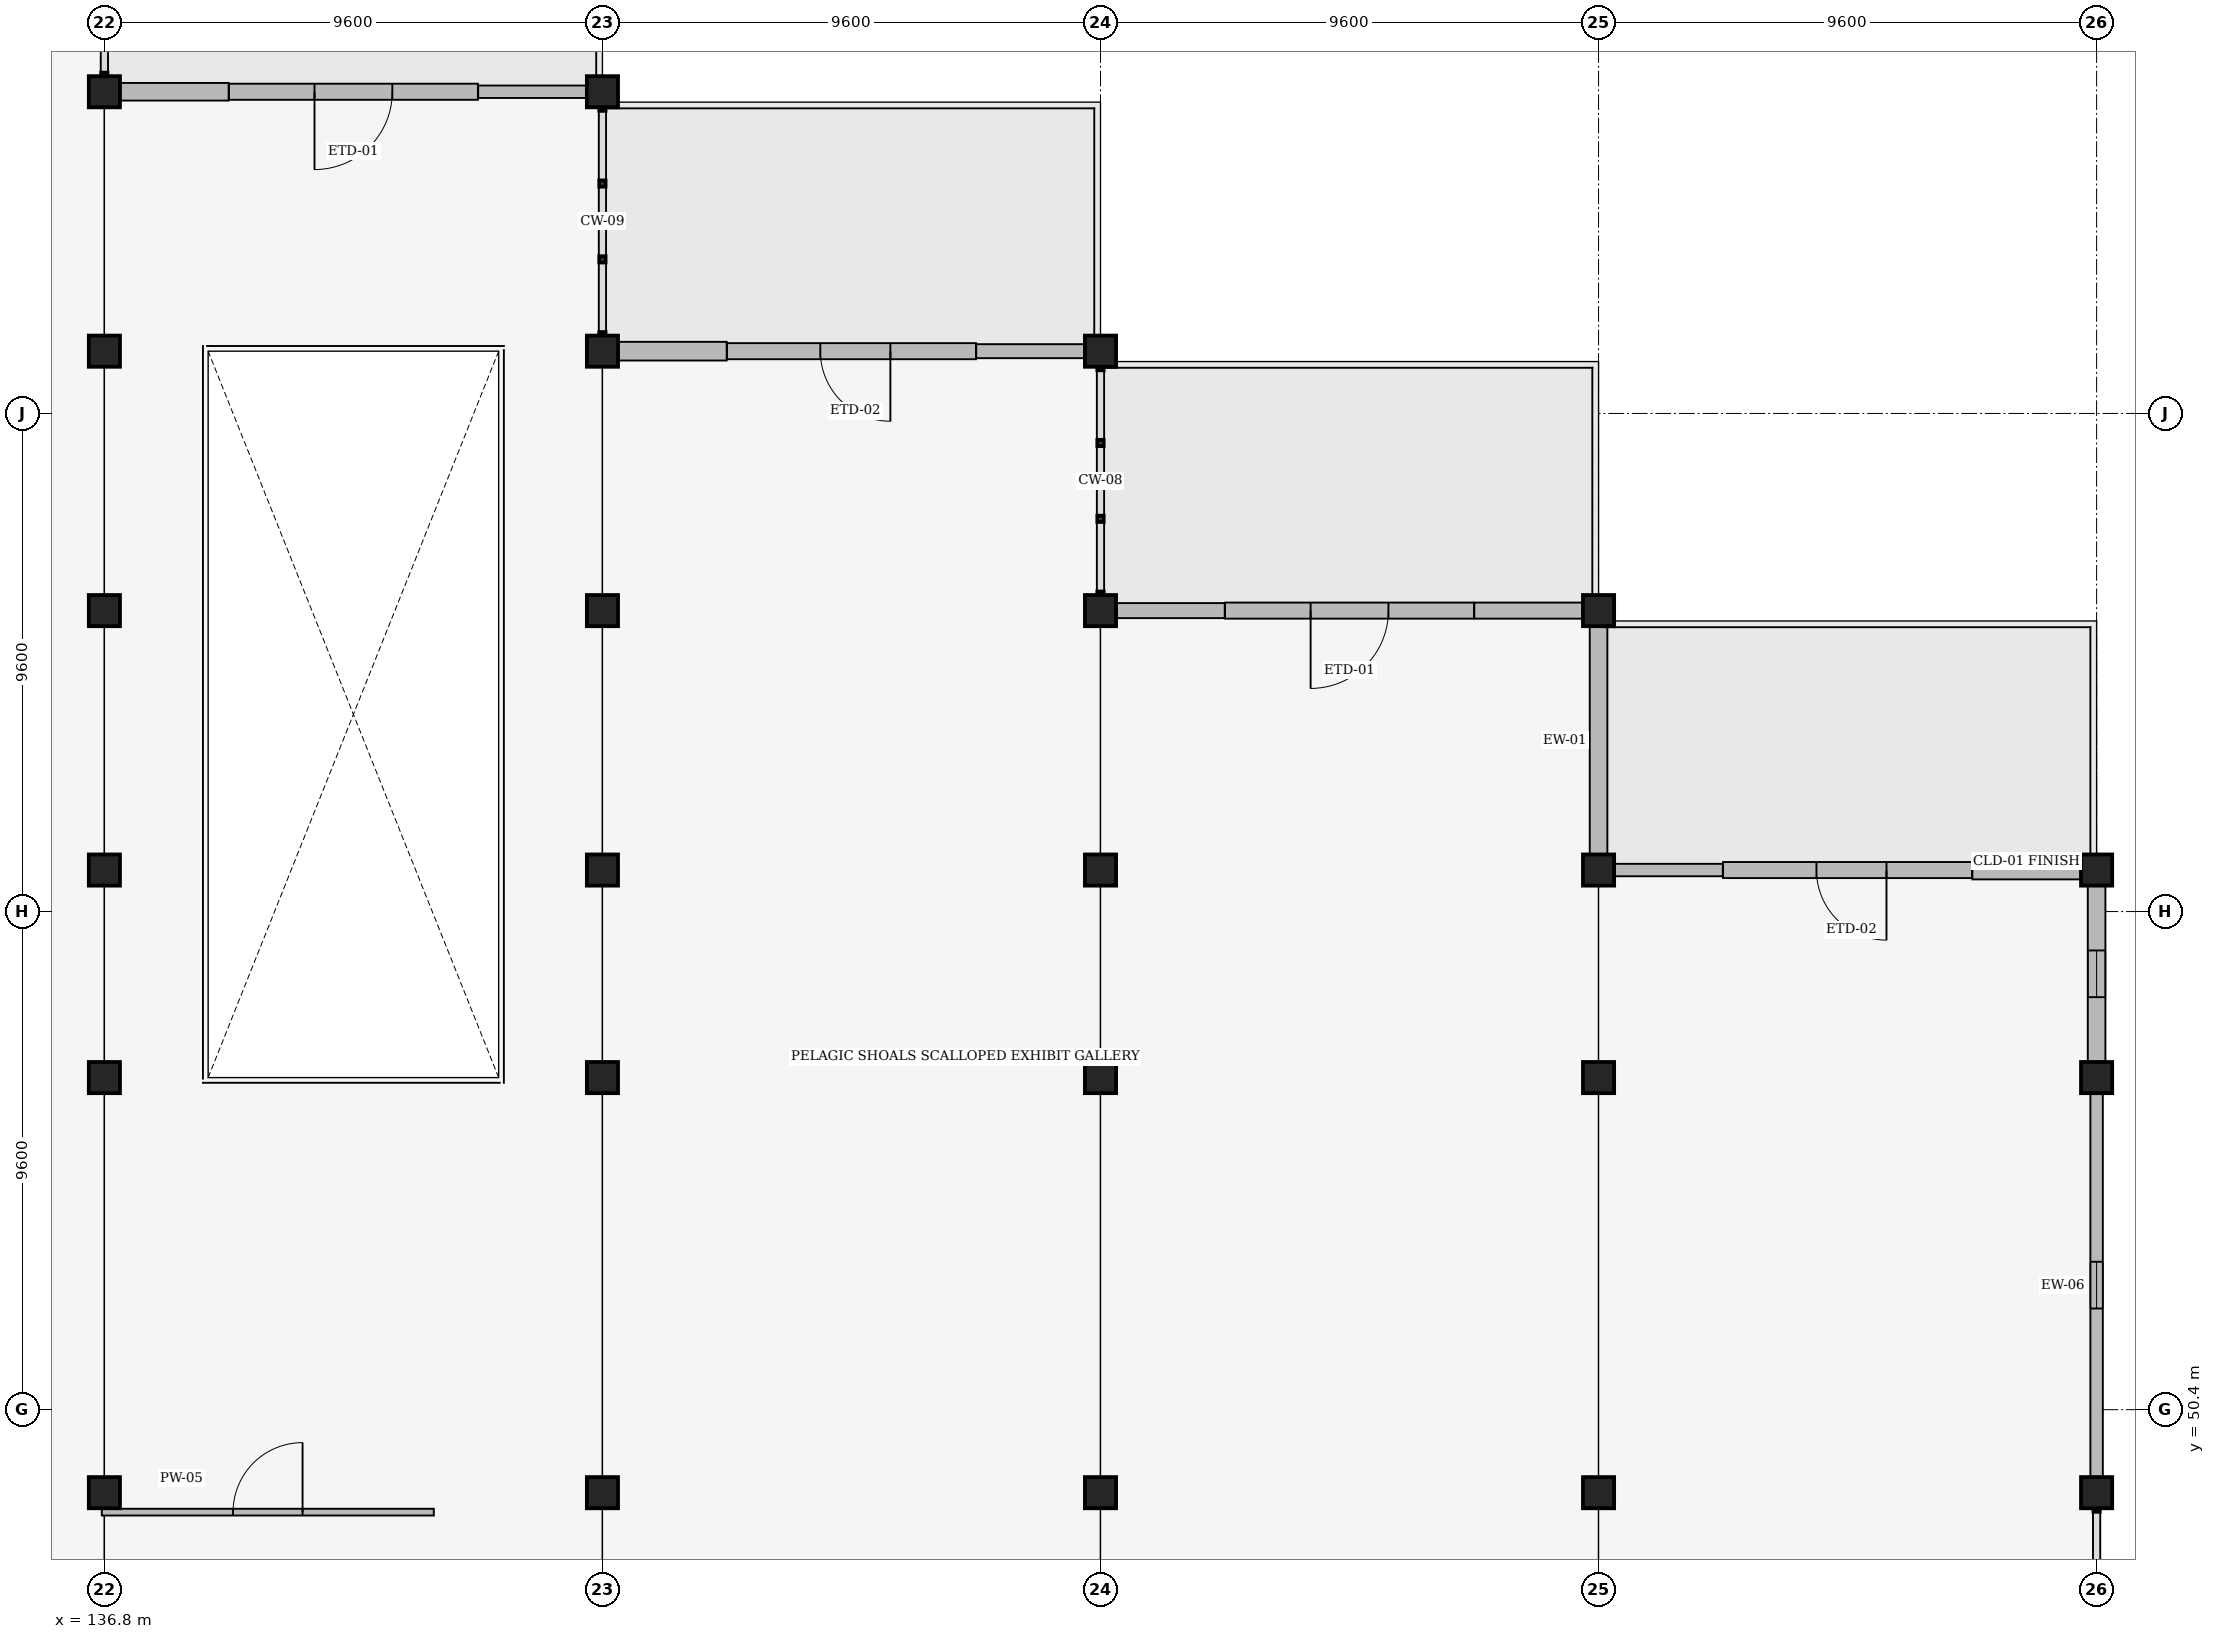
"""IFC4 building model, lengths in metres.
Left out: names, types, materials, properties, quantities, classifications, styles, units other than length and angle.
Written with IfcOpenShell. Run it as: python <this file> out.ifc"""

import sys

from ifc_helpers import new_model, si_unit, direction, frame, frame_2d, origin, origin_2d, place, context, subcontext, project, spatial, rectangle, extrude, element, fill, save


model = new_model("IFC4")
c1 = context("Model", 3, precision=1e-05, world=origin(), true_north=direction((0.0, 1.0)))
c2 = subcontext(c1, "Body", "Model", "MODEL_VIEW")
j1 = project(units=[si_unit("LENGTHUNIT", "METRE"), si_unit("PLANEANGLEUNIT", "RADIAN")], contexts=[c1])
p1 = place(None, origin())
s1 = spatial("IfcSite", under=j1, at=p1, CompositionType="ELEMENT")
p2 = place(p1, origin())
s2 = spatial("IfcBuilding", under=s1, at=p2, CompositionType="ELEMENT")
p3 = place(p2, frame((0.0, 0.0, 10.5)))
s3 = spatial("IfcBuildingStorey", under=s2, at=p3, CompositionType="ELEMENT", Elevation=10.5)
for number, where, z_axis, x_axis in (
    (1, (136.8, 48.8, 0.0), (0.0, 0.0, 1.0), (1.0, 0.0, 0.0)),
    (2, (136.8, 56.8, 0.0), (0.0, 0.0, 1.0), (1.0, 0.0, 0.0)),
    (3, (136.8, 60.8, 0.0), (0.0, 0.0, 1.0), (1.0, 0.0, 0.0)),
    (4, (136.8, 65.8, 0.0), (0.0, 0.0, 1.0), (1.0, 0.0, 0.0)),
    (5, (136.8, 70.8, 0.0), (0.0, 0.0, 1.0), (1.0, 0.0, 0.0)),
    (6, (136.8, 75.8, 0.0), (0.0, 0.0, 1.0), (1.0, 0.0, 0.0)),
    (7, (146.4, 48.8, 0.0), (0.0, 0.0, 1.0), (1.0, 0.0, 0.0)),
    (8, (146.4, 56.8, 0.0), (0.0, 0.0, 1.0), (1.0, 0.0, 0.0)),
    (9, (146.4, 60.8, 0.0), (0.0, 0.0, 1.0), (1.0, 0.0, 0.0)),
    (10, (146.4, 65.8, 0.0), (0.0, 0.0, 1.0), (1.0, 0.0, 0.0)),
    (11, (146.4, 70.8, 0.0), (0.0, 0.0, 1.0), (1.0, 0.0, 0.0)),
    (12, (146.4, 75.8, 0.0), (0.0, 0.0, 1.0), (1.0, 0.0, 0.0)),
    (13, (156.0, 48.8, 0.0), (0.0, 0.0, 1.0), (1.0, 0.0, 0.0)),
    (14, (156.0, 56.8, 0.0), (0.0, 0.0, 1.0), (1.0, 0.0, 0.0)),
    (15, (156.0, 60.8, 0.0), (0.0, 0.0, 1.0), (1.0, 0.0, 0.0)),
    (16, (156.0, 65.8, 0.0), (0.0, 0.0, 1.0), (1.0, 0.0, 0.0)),
    (17, (156.0, 70.8, 0.0), (0.0, 0.0, 1.0), (1.0, 0.0, 0.0)),
    (18, (165.6, 48.8, 0.0), (0.0, 0.0, 1.0), (1.0, 0.0, 0.0)),
    (19, (165.6, 56.8, 0.0), (0.0, 0.0, 1.0), (1.0, 0.0, 0.0)),
    (20, (165.6, 60.8, 0.0), (0.0, 0.0, 1.0), (1.0, 0.0, 0.0)),
    (21, (165.6, 65.8, 0.0), (0.0, 0.0, 1.0), (1.0, 0.0, 0.0)),
    (22, (175.2, 48.8, 0.0), (0.0, 0.0, 1.0), (1.0, 0.0, 0.0)),
    (23, (175.2, 56.8, 0.0), (0.0, 0.0, 1.0), (1.0, 0.0, 0.0)),
    (24, (175.2, 60.8, 0.0), (0.0, 0.0, 1.0), (1.0, 0.0, 0.0)),
):
    element("IfcColumn", number, at=place(p3, frame(where, z_axis=z_axis, x_axis=x_axis)), inside=s3, PredefinedType="COLUMN", context=c2, shape_type="SweptSolid", body=[
        extrude(rectangle(XDim=0.6, YDim=0.6, at=origin_2d()), origin(), (0.0, 0.0, 1.0), 4.8),
    ])
p4 = place(p3, frame((144.0, 75.8, 0.0), z_axis=(0.0, 0.0, 1.0), x_axis=(-1.0, 0.0, 0.0)))
e25 = element("IfcWall", 25, at=p4, inside=s3, PredefinedType="SOLIDWALL", context=c2, shape_type="SweptSolid", body=[
    extrude(rectangle(XDim=4.8, YDim=0.31, at=frame_2d((2.4, 0.0))), origin(), (0.0, 0.0, 1.0), 3.912),
])
p5 = place(p4, frame((3.15, 0.0, 0.0), z_axis=(0.0, 0.0, 1.0), x_axis=(-1.0, 0.0, 0.0)))
e26 = element("IfcOpeningElement", 26, at=p5, cuts=e25, PredefinedType="OPENING", context=c2, shape_type="SweptSolid", body=[
    extrude(rectangle(XDim=1.5, YDim=2.25, at=frame_2d((0.75, 1.125))), frame((0.0, 0.165, 0.0), z_axis=(0.0, -1.0, 0.0), x_axis=(1.0, 0.0, 0.0)), (0.0, 0.0, 1.0), 0.33),
])
p6 = place(p3, frame((153.6, 70.8, 0.0), z_axis=(0.0, 0.0, 1.0), x_axis=(-1.0, 0.0, 0.0)))
e27 = element("IfcWall", 27, at=p6, inside=s3, PredefinedType="SOLIDWALL", context=c2, shape_type="SweptSolid", body=[
    extrude(rectangle(XDim=4.8, YDim=0.31, at=frame_2d((2.4, 0.0))), origin(), (0.0, 0.0, 1.0), 4.093),
])
p7 = place(p6, frame((3.0, 0.0, 0.0), z_axis=(0.0, 0.0, 1.0), x_axis=(-1.0, 0.0, 0.0)))
e28 = element("IfcOpeningElement", 28, at=p7, cuts=e27, PredefinedType="OPENING", context=c2, shape_type="SweptSolid", body=[
    extrude(rectangle(XDim=1.35, YDim=2.2, at=frame_2d((0.675, 1.1))), frame((0.0, 0.165, 0.0), z_axis=(0.0, -1.0, 0.0), x_axis=(1.0, 0.0, 0.0)), (0.0, 0.0, 1.0), 0.33),
])
p8 = place(p3, frame((163.2, 65.8, 0.0), z_axis=(0.0, 0.0, 1.0), x_axis=(-1.0, 0.0, 0.0)))
e29 = element("IfcWall", 29, at=p8, inside=s3, PredefinedType="SOLIDWALL", context=c2, shape_type="SweptSolid", body=[
    extrude(rectangle(XDim=4.8, YDim=0.31, at=frame_2d((2.4, 0.0))), origin(), (0.0, 0.0, 1.0), 3.912),
])
p9 = place(p8, frame((3.15, 0.0, 0.0), z_axis=(0.0, 0.0, 1.0), x_axis=(-1.0, 0.0, 0.0)))
e30 = element("IfcOpeningElement", 30, at=p9, cuts=e29, PredefinedType="OPENING", context=c2, shape_type="SweptSolid", body=[
    extrude(rectangle(XDim=1.5, YDim=2.25, at=frame_2d((0.75, 1.125))), frame((0.0, 0.165, 0.0), z_axis=(0.0, -1.0, 0.0), x_axis=(1.0, 0.0, 0.0)), (0.0, 0.0, 1.0), 0.33),
])
p10 = place(p3, frame((172.8, 60.8, 0.0), z_axis=(0.0, 0.0, 1.0), x_axis=(-1.0, 0.0, 0.0)))
e31 = element("IfcWall", 31, at=p10, inside=s3, PredefinedType="SOLIDWALL", context=c2, shape_type="SweptSolid", body=[
    extrude(rectangle(XDim=4.8, YDim=0.31, at=frame_2d((2.4, 0.0))), origin(), (0.0, 0.0, 1.0), 3.987),
])
p11 = place(p10, frame((3.0, 0.0, 0.0), z_axis=(0.0, 0.0, 1.0), x_axis=(-1.0, 0.0, 0.0)))
e32 = element("IfcOpeningElement", 32, at=p11, cuts=e31, PredefinedType="OPENING", context=c2, shape_type="SweptSolid", body=[
    extrude(rectangle(XDim=1.35, YDim=2.2, at=frame_2d((0.675, 1.1))), frame((0.0, 0.165, 0.0), z_axis=(0.0, -1.0, 0.0), x_axis=(1.0, 0.0, 0.0)), (0.0, 0.0, 1.0), 0.33),
])
p12 = place(p3, frame((174.892, 60.8, 0.0), z_axis=(0.0, 0.0, 1.0), x_axis=(-1.0, 0.0, 0.0)))
e33 = element("IfcWall", 33, at=p12, inside=s3, PredefinedType="SOLIDWALL", context=c2, shape_type="SweptSolid", body=[
    extrude(rectangle(XDim=2.087, YDim=0.36, at=frame_2d((1.043, 0.0))), origin(), (0.0, 0.0, 1.0), 3.987),
])
p13 = place(p3, frame((167.995, 60.8, 0.0), z_axis=(0.0, 0.0, 1.0), x_axis=(-1.0, 0.0, 0.0)))
e34 = element("IfcWall", 34, at=p13, inside=s3, PredefinedType="SOLIDWALL", context=c2, shape_type="SweptSolid", body=[
    extrude(rectangle(XDim=2.087, YDim=0.24, at=frame_2d((1.043, 0.0))), origin(), (0.0, 0.0, 1.0), 3.987),
])
p14 = place(p3, frame((165.6, 61.108, 0.0), z_axis=(0.0, 0.0, 1.0), x_axis=(0.0, 1.0, 0.0)))
e35 = element("IfcWall", 35, at=p14, inside=s3, PredefinedType="SOLIDWALL", context=c2, shape_type="SweptSolid", body=[
    extrude(rectangle(XDim=4.384, YDim=0.34, at=frame_2d((2.192, 0.0))), origin(), (0.0, 0.0, 1.0), 3.987),
])
p15 = place(p3, frame((165.292, 65.8, 0.0), z_axis=(0.0, 0.0, 1.0), x_axis=(-1.0, 0.0, 0.0)))
e36 = element("IfcWall", 36, at=p15, inside=s3, PredefinedType="SOLIDWALL", context=c2, shape_type="SweptSolid", body=[
    extrude(rectangle(XDim=2.087, YDim=0.31, at=frame_2d((1.043, 0.0))), origin(), (0.0, 0.0, 1.0), 3.912),
])
p16 = place(p3, frame((158.395, 65.8, 0.0), z_axis=(0.0, 0.0, 1.0), x_axis=(-1.0, 0.0, 0.0)))
e37 = element("IfcWall", 37, at=p16, inside=s3, PredefinedType="SOLIDWALL", context=c2, shape_type="SweptSolid", body=[
    extrude(rectangle(XDim=2.087, YDim=0.29, at=frame_2d((1.043, 0.0))), origin(), (0.0, 0.0, 1.0), 3.845),
])
p17 = place(p3, frame((155.692, 70.8, 0.0), z_axis=(0.0, 0.0, 1.0), x_axis=(-1.0, 0.0, 0.0)))
e38 = element("IfcWall", 38, at=p17, inside=s3, PredefinedType="SOLIDWALL", context=c2, shape_type="SweptSolid", body=[
    extrude(rectangle(XDim=2.087, YDim=0.27, at=frame_2d((1.043, 0.0))), origin(), (0.0, 0.0, 1.0), 4.093),
])
p18 = place(p3, frame((148.795, 70.8, 0.0), z_axis=(0.0, 0.0, 1.0), x_axis=(-1.0, 0.0, 0.0)))
e39 = element("IfcWall", 39, at=p18, inside=s3, PredefinedType="SOLIDWALL", context=c2, shape_type="SweptSolid", body=[
    extrude(rectangle(XDim=2.087, YDim=0.36, at=frame_2d((1.043, 0.0))), origin(), (0.0, 0.0, 1.0), 4.093),
])
p19 = place(p3, frame((146.092, 75.8, 0.0), z_axis=(0.0, 0.0, 1.0), x_axis=(-1.0, 0.0, 0.0)))
e40 = element("IfcWall", 40, at=p19, inside=s3, PredefinedType="SOLIDWALL", context=c2, shape_type="SweptSolid", body=[
    extrude(rectangle(XDim=2.087, YDim=0.24, at=frame_2d((1.043, 0.0))), origin(), (0.0, 0.0, 1.0), 3.912),
])
p20 = place(p3, frame((139.195, 75.8, 0.0), z_axis=(0.0, 0.0, 1.0), x_axis=(-1.0, 0.0, 0.0)))
e41 = element("IfcWall", 41, at=p20, inside=s3, PredefinedType="SOLIDWALL", context=c2, shape_type="SweptSolid", body=[
    extrude(rectangle(XDim=2.087, YDim=0.34, at=frame_2d((1.043, 0.0))), origin(), (0.0, 0.0, 1.0), 3.912),
])
p21 = place(p3, frame((175.2, 49.108, 0.0), z_axis=(0.0, 0.0, 1.0), x_axis=(0.0, 1.0, 0.0)))
e42 = element("IfcWall", 42, at=p21, inside=s3, PredefinedType="SOLIDWALL", context=c2, shape_type="SweptSolid", body=[
    extrude(rectangle(XDim=7.384, YDim=0.24, at=frame_2d((3.692, 0.0))), origin(), (0.0, 0.0, 1.0), 4.039),
])
p22 = place(p21, frame((3.242, 0.0, 0.95)))
e43 = element("IfcOpeningElement", 43, at=p22, cuts=e42, PredefinedType="OPENING", context=c2, shape_type="SweptSolid", body=[
    extrude(rectangle(XDim=0.9, YDim=1.5, at=frame_2d((0.45, 0.75))), frame((0.0, 0.13, 0.0), z_axis=(0.0, -1.0, 0.0), x_axis=(1.0, 0.0, 0.0)), (0.0, 0.0, 1.0), 0.26),
])
p23 = place(p3, frame((175.2, 57.108, 0.0), z_axis=(0.0, 0.0, 1.0), x_axis=(0.0, 1.0, 0.0)))
e44 = element("IfcWall", 44, at=p23, inside=s3, PredefinedType="SOLIDWALL", context=c2, shape_type="SweptSolid", body=[
    extrude(rectangle(XDim=3.384, YDim=0.34, at=frame_2d((1.692, 0.0))), origin(), (0.0, 0.0, 1.0), 4.039),
])
p24 = place(p23, frame((1.242, 0.0, 0.95)))
e45 = element("IfcOpeningElement", 45, at=p24, cuts=e44, PredefinedType="OPENING", context=c2, shape_type="SweptSolid", body=[
    extrude(rectangle(XDim=0.9, YDim=1.8, at=frame_2d((0.45, 0.9))), frame((0.0, 0.18, 0.0), z_axis=(0.0, -1.0, 0.0), x_axis=(1.0, 0.0, 0.0)), (0.0, 0.0, 1.0), 0.36),
])
p25 = place(p3, frame((136.75, 48.425, 0.0), z_axis=(0.0, 0.0, 1.0), x_axis=(1.0, 0.0, 0.0)))
e46 = element("IfcWall", 46, at=p25, inside=s3, PredefinedType="PARTITIONING", context=c2, shape_type="SweptSolid", body=[
    extrude(rectangle(XDim=6.4, YDim=0.13, at=frame_2d((3.2, 0.0))), origin(), (0.0, 0.0, 1.0), 3.844),
])
p26 = place(p25, frame((2.53, 0.0, 0.0)))
e47 = element("IfcOpeningElement", 47, at=p26, cuts=e46, PredefinedType="OPENING", context=c2, shape_type="SweptSolid", body=[
    extrude(rectangle(XDim=1.34, YDim=2.28, at=frame_2d((0.67, 1.14))), frame((0.0, 0.075, 0.0), z_axis=(0.0, -1.0, 0.0), x_axis=(1.0, 0.0, 0.0)), (0.0, 0.0, 1.0), 0.15),
])
p27 = place(p5, origin())
e48 = element("IfcDoor", 48, at=p27, inside=s3, OperationType="SINGLE_SWING_LEFT", PredefinedType="DOOR", context=c2, shape_type="SweptSolid", body=[
    extrude(rectangle(XDim=1.5, YDim=2.25, at=frame_2d((0.75, 1.125))), frame((0.0, 0.025, 0.0), z_axis=(0.0, -1.0, 0.0), x_axis=(1.0, 0.0, 0.0)), (0.0, 0.0, 1.0), 0.05),
])
fill(e26, e48)
p28 = place(p7, origin())
e49 = element("IfcDoor", 49, at=p28, inside=s3, OperationType="SINGLE_SWING_RIGHT", PredefinedType="DOOR", context=c2, shape_type="SweptSolid", body=[
    extrude(rectangle(XDim=1.35, YDim=2.2, at=frame_2d((0.675, 1.1))), frame((0.0, 0.025, 0.0), z_axis=(0.0, -1.0, 0.0), x_axis=(1.0, 0.0, 0.0)), (0.0, 0.0, 1.0), 0.05),
])
fill(e28, e49)
p29 = place(p9, origin())
e50 = element("IfcDoor", 50, at=p29, inside=s3, OperationType="SINGLE_SWING_LEFT", PredefinedType="DOOR", context=c2, shape_type="SweptSolid", body=[
    extrude(rectangle(XDim=1.5, YDim=2.25, at=frame_2d((0.75, 1.125))), frame((0.0, 0.025, 0.0), z_axis=(0.0, -1.0, 0.0), x_axis=(1.0, 0.0, 0.0)), (0.0, 0.0, 1.0), 0.05),
])
fill(e30, e50)
p30 = place(p11, origin())
e51 = element("IfcDoor", 51, at=p30, inside=s3, OperationType="SINGLE_SWING_RIGHT", PredefinedType="DOOR", context=c2, shape_type="SweptSolid", body=[
    extrude(rectangle(XDim=1.35, YDim=2.2, at=frame_2d((0.675, 1.1))), frame((0.0, 0.025, 0.0), z_axis=(0.0, -1.0, 0.0), x_axis=(1.0, 0.0, 0.0)), (0.0, 0.0, 1.0), 0.05),
])
fill(e32, e51)
p31 = place(p22, origin())
e52 = element("IfcWindow", 52, at=p31, inside=s3, PartitioningType="SINGLE_PANEL", PredefinedType="WINDOW", context=c2, shape_type="SweptSolid", body=[
    extrude(rectangle(XDim=0.9, YDim=1.5, at=frame_2d((0.45, 0.75))), frame((0.0, 0.03, 0.0), z_axis=(0.0, -1.0, 0.0), x_axis=(1.0, 0.0, 0.0)), (0.0, 0.0, 1.0), 0.06),
])
fill(e43, e52)
p32 = place(p24, origin())
e53 = element("IfcWindow", 53, at=p32, inside=s3, PartitioningType="SINGLE_PANEL", PredefinedType="WINDOW", context=c2, shape_type="SweptSolid", body=[
    extrude(rectangle(XDim=0.9, YDim=1.8, at=frame_2d((0.45, 0.9))), frame((0.0, 0.03, 0.0), z_axis=(0.0, -1.0, 0.0), x_axis=(1.0, 0.0, 0.0)), (0.0, 0.0, 1.0), 0.06),
])
fill(e45, e53)
p33 = place(p26, origin())
e54 = element("IfcDoor", 54, at=p33, inside=s3, OperationType="SINGLE_SWING_RIGHT", PredefinedType="DOOR", context=c2, shape_type="SweptSolid", body=[
    extrude(rectangle(XDim=1.34, YDim=2.28, at=frame_2d((0.67, 1.14))), frame((0.0, 0.025, 0.0), z_axis=(0.0, -1.0, 0.0), x_axis=(1.0, 0.0, 0.0)), (0.0, 0.0, 1.0), 0.05),
])
fill(e47, e54)
save(model, sys.argv[1])
